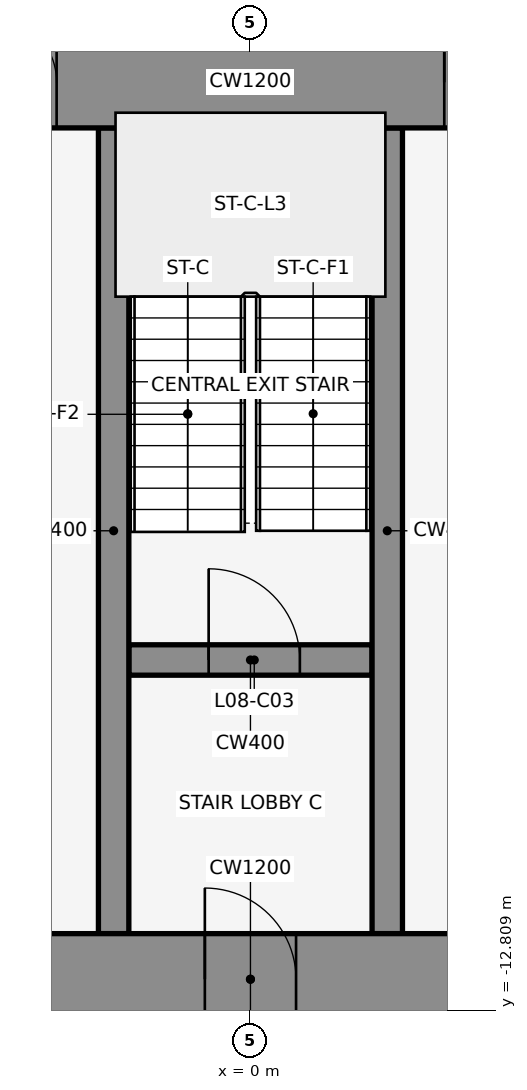
"""IFC4 building model, lengths in metres.
Left out: names, types, materials, properties, quantities, classifications, styles, units other than length and angle.
Written with IfcOpenShell. Run it as: python <this file> out.ifc"""

import sys

from ifc_helpers import new_model, si_unit, direction, frame, frame_2d, origin, place, context, subcontext, project, spatial, rectangle, extrude, element, fill, save


model = new_model("IFC4")
c1 = context("Model", 3, precision=1e-05, world=origin(), true_north=direction((0.0, 1.0)))
c2 = subcontext(c1, "Body", "Model", "MODEL_VIEW")
j1 = project(units=[si_unit("LENGTHUNIT", "METRE"), si_unit("PLANEANGLEUNIT", "RADIAN")], contexts=[c1])
p1 = place(None, origin())
s1 = spatial("IfcSite", under=j1, at=p1, CompositionType="ELEMENT")
p2 = place(p1, origin())
s2 = spatial("IfcBuilding", under=s1, at=p2, CompositionType="ELEMENT")
p3 = place(p2, frame((0.0, 0.0, 44.0)))
s3 = spatial("IfcBuildingStorey", under=s2, at=p3, CompositionType="ELEMENT", Elevation=44.0)
for number, where, z_axis, x_axis in (
    (1, (1.901, 1.08, 0.0), (0.0, 0.0, 1.0), (-0.84, -0.543, 0.0)),
    (2, (-0.068, -0.105, 0.0), (0.0, 0.0, 1.0), (-0.84, 0.543, 0.0)),
):
    element("IfcWall", number, at=place(p3, frame(where, z_axis=z_axis, x_axis=x_axis)), inside=s3, PredefinedType="STANDARD", context=c2, shape_type="SweptSolid", body=[
        extrude(rectangle(XDim=2.183, YDim=0.25, at=frame_2d((1.091, 0.0))), origin(), (0.0, 0.0, 1.0), 4.35),
    ])
p4 = place(p3, frame((-1.6, -8.2, 0.0), z_axis=(0.0, 0.0, 1.0), x_axis=(1.0, 0.0, 0.0)))
e3 = element("IfcWall", 3, at=p4, inside=s3, PredefinedType="SHEAR", context=c2, shape_type="SweptSolid", body=[
    extrude(rectangle(XDim=3.2, YDim=0.4, at=frame_2d((1.6, 0.0))), origin(), (0.0, 0.0, 1.0), 4.5),
])
p5 = place(p4, frame((1.05, 0.0, 0.0)))
e4 = element("IfcOpeningElement", 4, at=p5, cuts=e3, PredefinedType="OPENING", context=c2, shape_type="SweptSolid", body=[
    extrude(rectangle(XDim=1.2, YDim=2.1, at=frame_2d((0.6, 1.05))), frame((0.0, 0.212, 0.0), z_axis=(0.0, -1.0, 0.0), x_axis=(1.0, 0.0, 0.0)), (0.0, 0.0, 1.0), 0.424),
])
for number, where, z_axis, x_axis in (
    (5, (-1.8, -11.8, 0.0), (0.0, 0.0, 1.0), (0.0, 1.0, 0.0)),
    (6, (1.8, -11.8, 0.0), (0.0, 0.0, 1.0), (0.0, 1.0, 0.0)),
):
    element("IfcWall", number, at=place(p3, frame(where, z_axis=z_axis, x_axis=x_axis)), inside=s3, PredefinedType="SHEAR", context=c2, shape_type="SweptSolid", body=[
        extrude(rectangle(XDim=10.6, YDim=0.4, at=frame_2d((5.3, 0.0))), origin(), (0.0, 0.0, 1.0), 4.5),
    ])
p6 = place(p3, frame((-22.0, -0.6, 0.0), z_axis=(0.0, 0.0, 1.0), x_axis=(1.0, 0.0, 0.0)))
e7 = element("IfcWall", 7, at=p6, inside=s3, PredefinedType="SHEAR", context=c2, shape_type="SweptSolid", body=[
    extrude(rectangle(XDim=44.0, YDim=1.2, at=frame_2d((22.0, 0.0))), origin(), (0.0, 0.0, 1.0), 4.5),
])
p7 = place(p6, frame((18.55, 0.0, 0.0)))
e8 = element("IfcOpeningElement", 8, at=p7, cuts=e7, PredefinedType="OPENING", context=c2, shape_type="SweptSolid", body=[
    extrude(rectangle(XDim=0.9, YDim=2.1, at=frame_2d((0.45, 1.05))), frame((0.0, 0.612, 0.0), z_axis=(0.0, -1.0, 0.0), x_axis=(1.0, 0.0, 0.0)), (0.0, 0.0, 1.0), 1.224),
])
p8 = place(p6, frame((24.55, 0.0, 0.0)))
e9 = element("IfcOpeningElement", 9, at=p8, cuts=e7, PredefinedType="OPENING", context=c2, shape_type="SweptSolid", body=[
    extrude(rectangle(XDim=0.9, YDim=2.1, at=frame_2d((0.45, 1.05))), frame((0.0, 0.612, 0.0), z_axis=(0.0, -1.0, 0.0), x_axis=(1.0, 0.0, 0.0)), (0.0, 0.0, 1.0), 1.224),
])
p9 = place(p3, frame((-22.0, -12.4, 0.0), z_axis=(0.0, 0.0, 1.0), x_axis=(1.0, 0.0, 0.0)))
e10 = element("IfcWall", 10, at=p9, inside=s3, PredefinedType="SHEAR", context=c2, shape_type="SweptSolid", body=[
    extrude(rectangle(XDim=44.0, YDim=1.2, at=frame_2d((22.0, 0.0))), origin(), (0.0, 0.0, 1.0), 4.5),
])
p10 = place(p9, frame((2.2, 0.0, 0.0)))
e11 = element("IfcOpeningElement", 11, at=p10, cuts=e10, PredefinedType="OPENING", context=c2, shape_type="SweptSolid", body=[
    extrude(rectangle(XDim=1.2, YDim=2.1, at=frame_2d((0.6, 1.05))), frame((0.0, 0.612, 0.0), z_axis=(0.0, -1.0, 0.0), x_axis=(1.0, 0.0, 0.0)), (0.0, 0.0, 1.0), 1.224),
])
p11 = place(p9, frame((21.4, 0.0, 0.0)))
e12 = element("IfcOpeningElement", 12, at=p11, cuts=e10, PredefinedType="OPENING", context=c2, shape_type="SweptSolid", body=[
    extrude(rectangle(XDim=1.2, YDim=2.1, at=frame_2d((0.6, 1.05))), frame((0.0, 0.612, 0.0), z_axis=(0.0, -1.0, 0.0), x_axis=(1.0, 0.0, 0.0)), (0.0, 0.0, 1.0), 1.224),
])
p12 = place(p9, frame((40.6, 0.0, 0.0)))
e13 = element("IfcOpeningElement", 13, at=p12, cuts=e10, PredefinedType="OPENING", context=c2, shape_type="SweptSolid", body=[
    extrude(rectangle(XDim=1.2, YDim=2.1, at=frame_2d((0.6, 1.05))), frame((0.0, 0.612, 0.0), z_axis=(0.0, -1.0, 0.0), x_axis=(1.0, 0.0, 0.0)), (0.0, 0.0, 1.0), 1.224),
])
p13 = place(p9, frame((16.0, 0.0, 0.0)))
e14 = element("IfcOpeningElement", 14, at=p13, cuts=e10, PredefinedType="OPENING", context=c2, shape_type="SweptSolid", body=[
    extrude(rectangle(XDim=1.8, YDim=2.1, at=frame_2d((0.9, 1.05))), frame((0.0, 0.612, 0.0), z_axis=(0.0, -1.0, 0.0), x_axis=(1.0, 0.0, 0.0)), (0.0, 0.0, 1.0), 1.224),
])
p14 = place(p9, frame((6.3, 0.0, 0.0)))
e15 = element("IfcOpeningElement", 15, at=p14, cuts=e10, PredefinedType="OPENING", context=c2, shape_type="SweptSolid", body=[
    extrude(rectangle(XDim=1.2, YDim=2.1, at=frame_2d((0.6, 1.05))), frame((0.0, 0.612, 0.0), z_axis=(0.0, -1.0, 0.0), x_axis=(1.0, 0.0, 0.0)), (0.0, 0.0, 1.0), 1.224),
])
p15 = place(p9, frame((26.2, 0.0, 0.0)))
e16 = element("IfcOpeningElement", 16, at=p15, cuts=e10, PredefinedType="OPENING", context=c2, shape_type="SweptSolid", body=[
    extrude(rectangle(XDim=1.8, YDim=2.1, at=frame_2d((0.9, 1.05))), frame((0.0, 0.612, 0.0), z_axis=(0.0, -1.0, 0.0), x_axis=(1.0, 0.0, 0.0)), (0.0, 0.0, 1.0), 1.224),
])
p16 = place(p9, frame((36.5, 0.0, 0.0)))
e17 = element("IfcOpeningElement", 17, at=p16, cuts=e10, PredefinedType="OPENING", context=c2, shape_type="SweptSolid", body=[
    extrude(rectangle(XDim=1.2, YDim=2.1, at=frame_2d((0.6, 1.05))), frame((0.0, 0.612, 0.0), z_axis=(0.0, -1.0, 0.0), x_axis=(1.0, 0.0, 0.0)), (0.0, 0.0, 1.0), 1.224),
])
p17 = place(p5, origin())
e18 = element("IfcDoor", 18, at=p17, inside=s3, OperationType="SINGLE_SWING_LEFT", PredefinedType="DOOR", context=c2, shape_type="SweptSolid", body=[
    extrude(rectangle(XDim=1.2, YDim=2.1, at=frame_2d((0.6, 1.05))), frame((0.0, 0.025, 0.0), z_axis=(0.0, -1.0, 0.0), x_axis=(1.0, 0.0, 0.0)), (0.0, 0.0, 1.0), 0.05),
])
fill(e4, e18)
p18 = place(p7, origin())
e19 = element("IfcDoor", 19, at=p18, inside=s3, OperationType="SINGLE_SWING_LEFT", PredefinedType="DOOR", context=c2, shape_type="SweptSolid", body=[
    extrude(rectangle(XDim=0.9, YDim=2.1, at=frame_2d((0.45, 1.05))), frame((0.0, 0.025, 0.0), z_axis=(0.0, -1.0, 0.0), x_axis=(1.0, 0.0, 0.0)), (0.0, 0.0, 1.0), 0.05),
])
fill(e8, e19)
p19 = place(p8, origin())
e20 = element("IfcDoor", 20, at=p19, inside=s3, OperationType="SINGLE_SWING_LEFT", PredefinedType="DOOR", context=c2, shape_type="SweptSolid", body=[
    extrude(rectangle(XDim=0.9, YDim=2.1, at=frame_2d((0.45, 1.05))), frame((0.0, 0.025, 0.0), z_axis=(0.0, -1.0, 0.0), x_axis=(1.0, 0.0, 0.0)), (0.0, 0.0, 1.0), 0.05),
])
fill(e9, e20)
p20 = place(p11, frame((1.2, 0.0, 0.0), z_axis=(0.0, 0.0, 1.0), x_axis=(-1.0, 0.0, 0.0)))
e21 = element("IfcDoor", 21, at=p20, inside=s3, OperationType="SINGLE_SWING_RIGHT", PredefinedType="DOOR", context=c2, shape_type="SweptSolid", body=[
    extrude(rectangle(XDim=1.2, YDim=2.1, at=frame_2d((0.6, 1.05))), frame((0.0, 0.025, 0.0), z_axis=(0.0, -1.0, 0.0), x_axis=(1.0, 0.0, 0.0)), (0.0, 0.0, 1.0), 0.05),
])
fill(e12, e21)
save(model, sys.argv[1])
